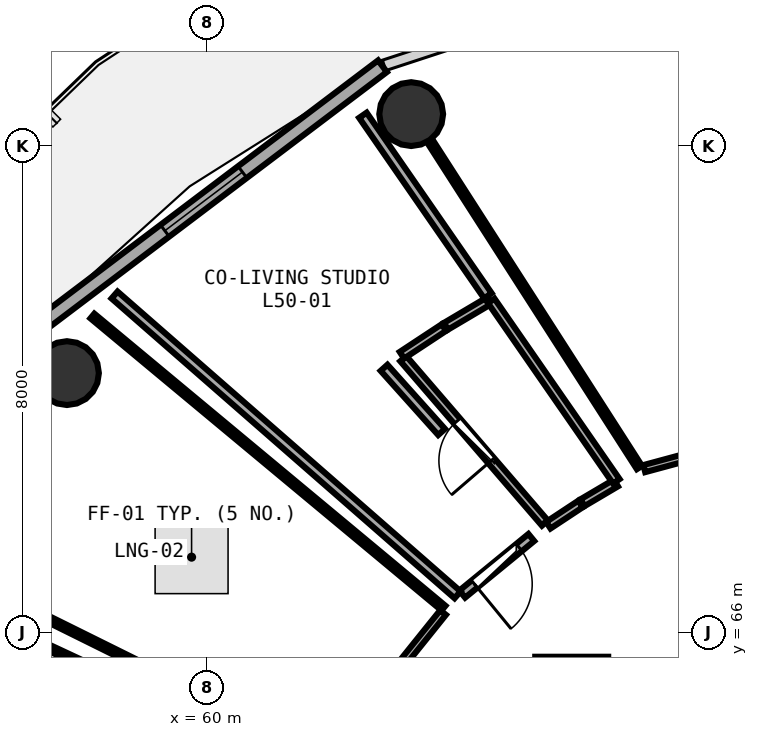
"""IFC4 building model, lengths in metres.
Left out: names, types, materials, properties, quantities, classifications, styles, units other than length and angle.
Written with IfcOpenShell. Run it as: python <this file> out.ifc"""

import sys

from ifc_helpers import new_model, si_unit, direction, frame, frame_2d, origin, origin_2d, place, context, subcontext, project, spatial, rectangle, circle, extrude, element, fill, save


model = new_model("IFC4")
c1 = context("Model", 3, precision=1e-05, world=origin(), true_north=direction((0.0, 1.0)))
c2 = subcontext(c1, "Body", "Model", "MODEL_VIEW")
j1 = project(units=[si_unit("LENGTHUNIT", "METRE"), si_unit("PLANEANGLEUNIT", "RADIAN")], contexts=[c1])
p1 = place(None, origin())
s1 = spatial("IfcSite", under=j1, at=p1, CompositionType="ELEMENT")
p2 = place(p1, origin())
s2 = spatial("IfcBuilding", under=s1, at=p2, CompositionType="ELEMENT")
p3 = place(p2, frame((0.0, 0.0, 196.95)))
s3 = spatial("IfcBuildingStorey", under=s2, at=p3, CompositionType="ELEMENT", Elevation=196.95)
p4 = place(p3, frame((66.0, 65.0, 0.0), z_axis=(0.0, 0.0, 1.0), x_axis=(1.0, 0.0, 0.0)))
e1 = element("IfcColumn", 1, at=p4, inside=s3, PredefinedType="PILASTER", context=c2, shape_type="SweptSolid", body=[
    extrude(rectangle(XDim=1.2, YDim=1.2, at=origin_2d()), origin(), (0.0, 0.0, 1.0), 3.75),
])
for number, where, z_axis, x_axis in (
    (2, (63.36, 74.524, 0.0), (0.0, 0.0, 1.0), (1.0, 0.0, 0.0)),
    (3, (57.698, 70.264, 0.0), (0.0, 0.0, 1.0), (1.0, 0.0, 0.0)),
):
    element("IfcColumn", number, at=place(p3, frame(where, z_axis=z_axis, x_axis=x_axis)), inside=s3, PredefinedType="COLUMN", context=c2, shape_type="SweptSolid", body=[
        extrude(circle(Radius=0.525, at=origin_2d()), origin(), (0.0, 0.0, 1.0), 3.75),
    ])
p5 = place(p3, frame((62.888, 75.312, 0.0), z_axis=(0.0, 0.0, 1.0), x_axis=(-0.797701674595, -0.603052268338, 0.0)))
e4 = element("IfcWall", 4, at=p5, inside=s3, PredefinedType="SOLIDWALL", context=c2, shape_type="SweptSolid", body=[
    extrude(rectangle(XDim=7.374, YDim=0.24, at=frame_2d((3.687, 0.0))), origin(), (0.0, 0.0, 1.0), 3.475),
])
p6 = place(p5, frame((2.887, 0.0, 0.85)))
e5 = element("IfcOpeningElement", 5, at=p6, cuts=e4, PredefinedType="OPENING", context=c2, shape_type="SweptSolid", body=[
    extrude(rectangle(XDim=1.6, YDim=1.45, at=frame_2d((0.8, 0.725))), frame((0.0, 0.13, 0.0), z_axis=(0.0, -1.0, 0.0), x_axis=(1.0, 0.0, 0.0)), (0.0, 0.0, 1.0), 0.26),
])
p7 = place(p3, frame((73.104, 70.291, 0.0), z_axis=(0.0, 0.0, 1.0), x_axis=(-0.965361221657, -0.260917059083, 0.0)))
e6 = element("IfcWall", 6, at=p7, inside=s3, PredefinedType="PARTITIONING", context=c2, shape_type="SweptSolid", body=[
    extrude(rectangle(XDim=6.123, YDim=0.12, at=frame_2d((3.062, 0.0))), origin(), (0.0, 0.0, 1.0), 3.025),
])
p8 = place(p7, frame((2.612, 0.0, 0.0)))
e7 = element("IfcOpeningElement", 7, at=p8, cuts=e6, PredefinedType="OPENING", context=c2, shape_type="SweptSolid", body=[
    extrude(rectangle(XDim=0.9, YDim=2.08, at=frame_2d((0.45, 1.04))), frame((0.0, 0.07, 0.0), z_axis=(0.0, -1.0, 0.0), x_axis=(1.0, 0.0, 0.0)), (0.0, 0.0, 1.0), 0.14),
])
p9 = place(p3, frame((65.56, 67.798, 0.0), z_axis=(0.0, 0.0, 1.0), x_axis=(-0.652591857515, 0.757709619515, 0.0)))
e8 = element("IfcWall", 8, at=p9, inside=s3, PredefinedType="PLUMBINGWALL", context=c2, shape_type="SweptSolid", body=[
    extrude(rectangle(XDim=3.57, YDim=0.13, at=frame_2d((1.785, 0.0))), origin(), (0.0, 0.0, 1.0), 3.025),
])
p10 = place(p9, frame((1.355, 0.0, 0.0)))
e9 = element("IfcOpeningElement", 9, at=p10, cuts=e8, PredefinedType="OPENING", context=c2, shape_type="SweptSolid", body=[
    extrude(rectangle(XDim=0.86, YDim=2.05, at=frame_2d((0.43, 1.025))), frame((0.0, 0.075, 0.0), z_axis=(0.0, -1.0, 0.0), x_axis=(1.0, 0.0, 0.0)), (0.0, 0.0, 1.0), 0.15),
])
p11 = place(p3, frame((65.336, 67.561, 0.0), z_axis=(0.0, 0.0, 1.0), x_axis=(-0.773453544763, -0.633852990917, 0.0)))
e10 = element("IfcWall", 10, at=p11, inside=s3, PredefinedType="PARTITIONING", context=c2, shape_type="SweptSolid", body=[
    extrude(rectangle(XDim=1.469, YDim=0.15, at=frame_2d((0.734, 0.0))), origin(), (0.0, 0.0, 1.0), 3.025),
])
p12 = place(p11, frame((0.259, 0.0, 0.0)))
e11 = element("IfcOpeningElement", 11, at=p12, cuts=e10, PredefinedType="OPENING", context=c2, shape_type="SweptSolid", body=[
    extrude(rectangle(XDim=0.95, YDim=2.08, at=frame_2d((0.475, 1.04))), frame((0.0, 0.085, 0.0), z_axis=(0.0, -1.0, 0.0), x_axis=(1.0, 0.0, 0.0)), (0.0, 0.0, 1.0), 0.17),
])
p13 = place(p3, frame((63.885, 66.327, 0.0), z_axis=(0.0, 0.0, 1.0), x_axis=(-0.626276824741, -0.779600756023, 0.0)))
e12 = element("IfcWall", 12, at=p13, inside=s3, PredefinedType="PARTITIONING", context=c2, shape_type="SweptSolid", body=[
    extrude(rectangle(XDim=2.99, YDim=0.12, at=frame_2d((1.495, 0.0))), origin(), (0.0, 0.0, 1.0), 3.025),
])
p14 = place(p13, frame((1.045, 0.0, 0.0)))
e13 = element("IfcOpeningElement", 13, at=p14, cuts=e12, PredefinedType="OPENING", context=c2, shape_type="SweptSolid", body=[
    extrude(rectangle(XDim=0.9, YDim=2.08, at=frame_2d((0.45, 1.04))), frame((0.0, 0.07, 0.0), z_axis=(0.0, -1.0, 0.0), x_axis=(1.0, 0.0, 0.0)), (0.0, 0.0, 1.0), 0.14),
])
p15 = place(p3, frame((67.113, 68.712, 0.0), z_axis=(0.0, 0.0, 1.0), x_axis=(-0.540224697902, 0.841520811256, 0.0)))
e14 = element("IfcWall", 14, at=p15, inside=s3, PredefinedType="PARTITIONING", context=c2, shape_type="SweptSolid", body=[
    extrude(rectangle(XDim=6.369, YDim=0.1, at=frame_2d((3.185, 0.0))), origin(), (0.0, 0.0, 1.0), 3.175),
])
p16 = place(p3, frame((66.728, 68.458, 0.0), z_axis=(0.0, 0.0, 1.0), x_axis=(-0.861116863464, -0.508407068655, 0.0)))
e15 = element("IfcWall", 15, at=p16, inside=s3, PredefinedType="PLUMBINGWALL", context=c2, shape_type="SweptSolid", body=[
    extrude(rectangle(XDim=0.638, YDim=0.13, at=frame_2d((0.319, 0.0))), origin(), (0.0, 0.0, 1.0), 3.48),
])
p17 = place(p3, frame((66.144, 68.112, 0.0), z_axis=(0.0, 0.0, 1.0), x_axis=(-0.834414447473, -0.551137487246, 0.0)))
e16 = element("IfcWall", 16, at=p17, inside=s3, PredefinedType="PLUMBINGWALL", context=c2, shape_type="SweptSolid", body=[
    extrude(rectangle(XDim=0.634, YDim=0.13, at=frame_2d((0.317, 0.0))), origin(), (0.0, 0.0, 1.0), 3.48),
])
p18 = place(p3, frame((63.208, 70.559, 0.0), z_axis=(0.0, 0.0, 1.0), x_axis=(0.835081531493, 0.550126199848, 0.0)))
e17 = element("IfcWall", 17, at=p18, inside=s3, PredefinedType="PLUMBINGWALL", context=c2, shape_type="SweptSolid", body=[
    extrude(rectangle(XDim=0.827, YDim=0.13, at=frame_2d((0.413, 0.0))), origin(), (0.0, 0.0, 1.0), 3.48),
])
p19 = place(p3, frame((63.932, 71.035, 0.0), z_axis=(0.0, 0.0, 1.0), x_axis=(0.860534659753, 0.509391891734, 0.0)))
e18 = element("IfcWall", 18, at=p19, inside=s3, PredefinedType="PLUMBINGWALL", context=c2, shape_type="SweptSolid", body=[
    extrude(rectangle(XDim=0.832, YDim=0.13, at=frame_2d((0.416, 0.0))), origin(), (0.0, 0.0, 1.0), 3.025),
])
p20 = place(p3, frame((64.677, 71.453, 0.0), z_axis=(0.0, 0.0, 1.0), x_axis=(0.569617686403, -0.821909782967, 0.0)))
e19 = element("IfcWall", 19, at=p20, inside=s3, PredefinedType="PLUMBINGWALL", context=c2, shape_type="SweptSolid", body=[
    extrude(rectangle(XDim=3.611, YDim=0.13, at=frame_2d((1.806, 0.0))), origin(), (0.0, 0.0, 1.0), 3.175),
])
p21 = place(p3, frame((64.123, 66.618, 0.0), z_axis=(0.0, 0.0, 1.0), x_axis=(-0.752988337425, 0.658033862124, 0.0)))
e20 = element("IfcWall", 20, at=p21, inside=s3, PredefinedType="PARTITIONING", context=c2, shape_type="SweptSolid", body=[
    extrude(rectangle(XDim=7.492, YDim=0.15, at=frame_2d((3.746, 0.0))), origin(), (0.0, 0.0, 1.0), 3.075),
])
p22 = place(p3, frame((62.566, 74.505, 0.0), z_axis=(0.0, 0.0, 1.0), x_axis=(0.569125600833, -0.822250600776, 0.0)))
e21 = element("IfcWall", 21, at=p22, inside=s3, PredefinedType="PARTITIONING", context=c2, shape_type="SweptSolid", body=[
    extrude(rectangle(XDim=3.611, YDim=0.15, at=frame_2d((1.806, 0.0))), origin(), (0.0, 0.0, 1.0), 3.025),
])
p23 = place(p3, frame((62.914, 70.352, 0.0), z_axis=(0.0, 0.0, 1.0), x_axis=(0.667393587085, -0.744705176508, 0.0)))
e22 = element("IfcWall", 22, at=p23, inside=s3, PredefinedType="PARTITIONING", context=c2, shape_type="SweptSolid", body=[
    extrude(rectangle(XDim=1.418, YDim=0.15, at=frame_2d((0.709, 0.0))), origin(), (0.0, 0.0, 1.0), 3.175),
])
p24 = place(p3, frame((61.938, 63.967, 0.0), z_axis=(0.0, 0.0, 1.0), x_axis=(-0.896052906747, 0.443947281003, 0.0)))
e23 = element("IfcWall", 23, at=p24, inside=s3, PredefinedType="PARTITIONING", context=c2, shape_type="SweptSolid", body=[
    extrude(rectangle(XDim=7.691, YDim=0.1, at=frame_2d((3.845, 0.0))), origin(), (0.0, 0.0, 1.0), 3.025),
])
p25 = place(p3, frame((58.117, 71.203, 0.0), z_axis=(0.0, 0.0, 1.0), x_axis=(0.768764498043, -0.63953197461, 0.0)))
e24 = element("IfcWall", 24, at=p25, inside=s3, PredefinedType="PARTITIONING", context=c2, shape_type="SweptSolid", body=[
    extrude(rectangle(XDim=7.511, YDim=0.1, at=frame_2d((3.756, 0.0))), origin(), (0.0, 0.0, 1.0), 3.025),
])
p26 = place(p3, frame((54.797, 66.963, 0.0), z_axis=(0.0, 0.0, 1.0), x_axis=(0.906002589331, -0.423272144283, 0.0)))
e25 = element("IfcWall", 25, at=p26, inside=s3, PredefinedType="PARTITIONING", context=c2, shape_type="SweptSolid", body=[
    extrude(rectangle(XDim=7.707, YDim=0.1, at=frame_2d((3.854, 0.0))), origin(), (0.0, 0.0, 1.0), 3.025),
])
p27 = place(p6, origin())
e26 = element("IfcWindow", 26, at=p27, inside=s3, PartitioningType="SINGLE_PANEL", PredefinedType="WINDOW", context=c2, shape_type="SweptSolid", body=[
    extrude(rectangle(XDim=1.6, YDim=1.45, at=frame_2d((0.8, 0.725))), frame((0.0, 0.03, 0.0), z_axis=(0.0, -1.0, 0.0), x_axis=(1.0, 0.0, 0.0)), (0.0, 0.0, 1.0), 0.06),
])
fill(e5, e26)
p28 = place(p10, origin())
e27 = element("IfcDoor", 27, at=p28, inside=s3, OperationType="SINGLE_SWING_LEFT", PredefinedType="DOOR", context=c2, shape_type="SweptSolid", body=[
    extrude(rectangle(XDim=0.86, YDim=2.05, at=frame_2d((0.43, 1.025))), frame((0.0, 0.025, 0.0), z_axis=(0.0, -1.0, 0.0), x_axis=(1.0, 0.0, 0.0)), (0.0, 0.0, 1.0), 0.05),
])
fill(e9, e27)
p29 = place(p12, origin())
e28 = element("IfcDoor", 28, at=p29, inside=s3, OperationType="SINGLE_SWING_RIGHT", PredefinedType="DOOR", context=c2, shape_type="SweptSolid", body=[
    extrude(rectangle(XDim=0.95, YDim=2.08, at=frame_2d((0.475, 1.04))), frame((0.0, 0.025, 0.0), z_axis=(0.0, -1.0, 0.0), x_axis=(1.0, 0.0, 0.0)), (0.0, 0.0, 1.0), 0.05),
])
fill(e11, e28)
save(model, sys.argv[1])
